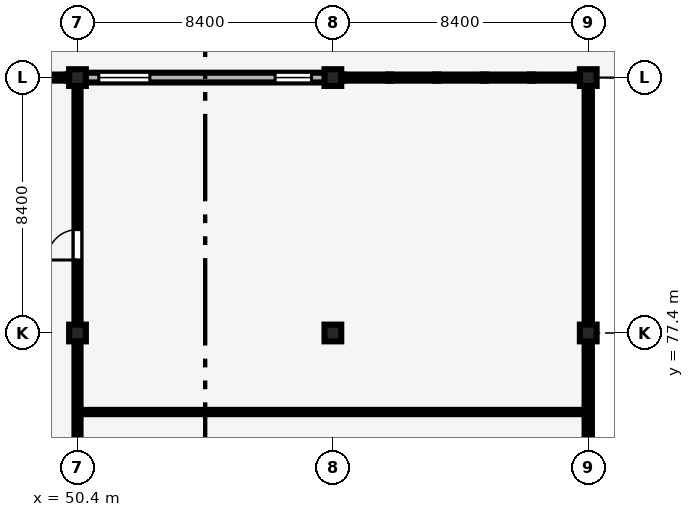
"""IFC4 building model, lengths in metres.
Left out: names, types, materials, properties, quantities, classifications, styles, units other than length and angle.
Written with IfcOpenShell. Run it as: python <this file> out.ifc"""

import sys

from ifc_helpers import new_model, si_unit, direction, frame, frame_2d, origin, origin_2d, place, context, subcontext, project, spatial, rectangle, extrude, element, fill, save


model = new_model("IFC4")
c1 = context("Model", 3, precision=1e-05, world=origin(), true_north=direction((0.0, 1.0)))
c2 = subcontext(c1, "Body", "Model", "MODEL_VIEW")
j1 = project(units=[si_unit("LENGTHUNIT", "METRE"), si_unit("PLANEANGLEUNIT", "RADIAN")], contexts=[c1])
p1 = place(None, origin())
s1 = spatial("IfcSite", under=j1, at=p1, CompositionType="ELEMENT")
p2 = place(p1, origin())
s2 = spatial("IfcBuilding", under=s1, at=p2, CompositionType="ELEMENT")
p3 = place(p2, frame((0.0, 0.0, 9.0)))
s3 = spatial("IfcBuildingStorey", under=s2, at=p3, CompositionType="ELEMENT", Elevation=9.0)
for number, where, z_axis, x_axis in (
    (1, (50.4, 77.4, 0.0), (0.0, 0.0, 1.0), (1.0, 0.0, 0.0)),
    (2, (50.4, 85.8, 0.0), (0.0, 0.0, 1.0), (1.0, 0.0, 0.0)),
    (3, (58.8, 77.4, 0.0), (0.0, 0.0, 1.0), (1.0, 0.0, 0.0)),
    (4, (58.8, 85.8, 0.0), (0.0, 0.0, 1.0), (1.0, 0.0, 0.0)),
    (5, (67.2, 77.4, 0.0), (0.0, 0.0, 1.0), (1.0, 0.0, 0.0)),
    (6, (67.2, 85.8, 0.0), (0.0, 0.0, 1.0), (1.0, 0.0, 0.0)),
):
    element("IfcColumn", number, at=place(p3, frame(where, z_axis=z_axis, x_axis=x_axis)), inside=s3, PredefinedType="COLUMN", context=c2, shape_type="SweptSolid", body=[
        extrude(rectangle(XDim=0.55, YDim=0.55, at=origin_2d()), origin(), (0.0, 0.0, 1.0), 4.2),
    ])
p4 = place(p3, frame((67.2, 69.25, 0.0), z_axis=(0.0, 0.0, 1.0), x_axis=(0.0, 1.0, 0.0)))
e7 = element("IfcWall", 7, at=p4, inside=s3, PredefinedType="SOLIDWALL", context=c2, shape_type="SweptSolid", body=[
    extrude(rectangle(XDim=7.9, YDim=0.24, at=frame_2d((3.95, 0.0))), origin(), (0.0, 0.0, 1.0), 1.15),
])
p5 = place(p3, frame((67.2, 77.65, 0.0), z_axis=(0.0, 0.0, 1.0), x_axis=(0.0, 1.0, 0.0)))
e8 = element("IfcWall", 8, at=p5, inside=s3, PredefinedType="SOLIDWALL", context=c2, shape_type="SweptSolid", body=[
    extrude(rectangle(XDim=7.9, YDim=0.24, at=frame_2d((3.95, 0.0))), origin(), (0.0, 0.0, 1.0), 1.15),
])
p6 = place(p3, frame((50.65, 85.8, 0.0), z_axis=(0.0, 0.0, 1.0), x_axis=(1.0, 0.0, 0.0)))
e9 = element("IfcWall", 9, at=p6, inside=s3, PredefinedType="SOLIDWALL", context=c2, shape_type="SweptSolid", body=[
    extrude(rectangle(XDim=7.9, YDim=0.32, at=frame_2d((3.95, 0.0))), origin(), (0.0, 0.0, 1.0), 3.01),
])
p7 = place(p6, frame((0.45, 0.0, 0.9)))
e10 = element("IfcOpeningElement", 10, at=p7, cuts=e9, PredefinedType="OPENING", context=c2, shape_type="SweptSolid", body=[
    extrude(rectangle(XDim=1.68, YDim=1.96, at=frame_2d((0.84, 0.98))), frame((0.0, 0.17, 0.0), z_axis=(0.0, -1.0, 0.0), x_axis=(1.0, 0.0, 0.0)), (0.0, 0.0, 1.0), 0.34),
])
p8 = place(p6, frame((6.25, 0.0, 0.9)))
e11 = element("IfcOpeningElement", 11, at=p8, cuts=e9, PredefinedType="OPENING", context=c2, shape_type="SweptSolid", body=[
    extrude(rectangle(XDim=1.2, YDim=1.5, at=frame_2d((0.6, 0.75))), frame((0.0, 0.17, 0.0), z_axis=(0.0, -1.0, 0.0), x_axis=(1.0, 0.0, 0.0)), (0.0, 0.0, 1.0), 0.34),
])
p9 = place(p3, frame((50.505, 74.8, 0.0), z_axis=(0.0, 0.0, 1.0), x_axis=(1.0, 0.0, 0.0)))
e12 = element("IfcWall", 12, at=p9, inside=s3, PredefinedType="PARTITIONING", context=c2, shape_type="SweptSolid", body=[
    extrude(rectangle(XDim=16.57, YDim=0.14, at=frame_2d((8.285, 0.0))), origin(), (0.0, 0.0, 1.0), 3.51),
])
p10 = place(p3, frame((50.4, 69.285, 0.0), z_axis=(0.0, 0.0, 1.0), x_axis=(0.0, 1.0, 0.0)))
e13 = element("IfcWall", 13, at=p10, inside=s3, PredefinedType="PARTITIONING", context=c2, shape_type="SweptSolid", body=[
    extrude(rectangle(XDim=7.83, YDim=0.2, at=frame_2d((3.915, 0.0))), origin(), (0.0, 0.0, 1.0), 3.16),
])
p11 = place(p10, frame((0.25, 0.0, 0.0)))
e14 = element("IfcOpeningElement", 14, at=p11, cuts=e13, PredefinedType="OPENING", context=c2, shape_type="SweptSolid", body=[
    extrude(rectangle(XDim=1.0, YDim=2.15, at=frame_2d((0.5, 1.075))), frame((0.0, 0.11, 0.0), z_axis=(0.0, -1.0, 0.0), x_axis=(1.0, 0.0, 0.0)), (0.0, 0.0, 1.0), 0.22),
])
p12 = place(p3, frame((50.4, 77.685, 0.0), z_axis=(0.0, 0.0, 1.0), x_axis=(0.0, 1.0, 0.0)))
e15 = element("IfcWall", 15, at=p12, inside=s3, PredefinedType="PARTITIONING", context=c2, shape_type="SweptSolid", body=[
    extrude(rectangle(XDim=8.01, YDim=0.2, at=frame_2d((4.005, 0.0))), origin(), (0.0, 0.0, 1.0), 3.21),
])
p13 = place(p12, frame((2.115, 0.0, 0.0)))
e16 = element("IfcOpeningElement", 16, at=p13, cuts=e15, PredefinedType="OPENING", context=c2, shape_type="SweptSolid", body=[
    extrude(rectangle(XDim=1.0, YDim=2.15, at=frame_2d((0.5, 1.075))), frame((0.0, 0.11, 0.0), z_axis=(0.0, -1.0, 0.0), x_axis=(1.0, 0.0, 0.0)), (0.0, 0.0, 1.0), 0.22),
])
p14 = place(p7, origin())
e17 = element("IfcWindow", 17, at=p14, inside=s3, PartitioningType="SINGLE_PANEL", PredefinedType="WINDOW", context=c2, shape_type="SweptSolid", body=[
    extrude(rectangle(XDim=1.68, YDim=1.96, at=frame_2d((0.84, 0.98))), frame((0.0, 0.03, 0.0), z_axis=(0.0, -1.0, 0.0), x_axis=(1.0, 0.0, 0.0)), (0.0, 0.0, 1.0), 0.06),
])
fill(e10, e17)
p15 = place(p8, origin())
e18 = element("IfcWindow", 18, at=p15, inside=s3, PartitioningType="SINGLE_PANEL", PredefinedType="WINDOW", context=c2, shape_type="SweptSolid", body=[
    extrude(rectangle(XDim=1.2, YDim=1.5, at=frame_2d((0.6, 0.75))), frame((0.0, 0.03, 0.0), z_axis=(0.0, -1.0, 0.0), x_axis=(1.0, 0.0, 0.0)), (0.0, 0.0, 1.0), 0.06),
])
fill(e11, e18)
p16 = place(p13, origin())
e19 = element("IfcDoor", 19, at=p16, inside=s3, OperationType="SINGLE_SWING_LEFT", PredefinedType="DOOR", context=c2, shape_type="SweptSolid", body=[
    extrude(rectangle(XDim=1.0, YDim=2.15, at=frame_2d((0.5, 1.075))), frame((0.0, 0.025, 0.0), z_axis=(0.0, -1.0, 0.0), x_axis=(1.0, 0.0, 0.0)), (0.0, 0.0, 1.0), 0.05),
])
fill(e16, e19)
save(model, sys.argv[1])
